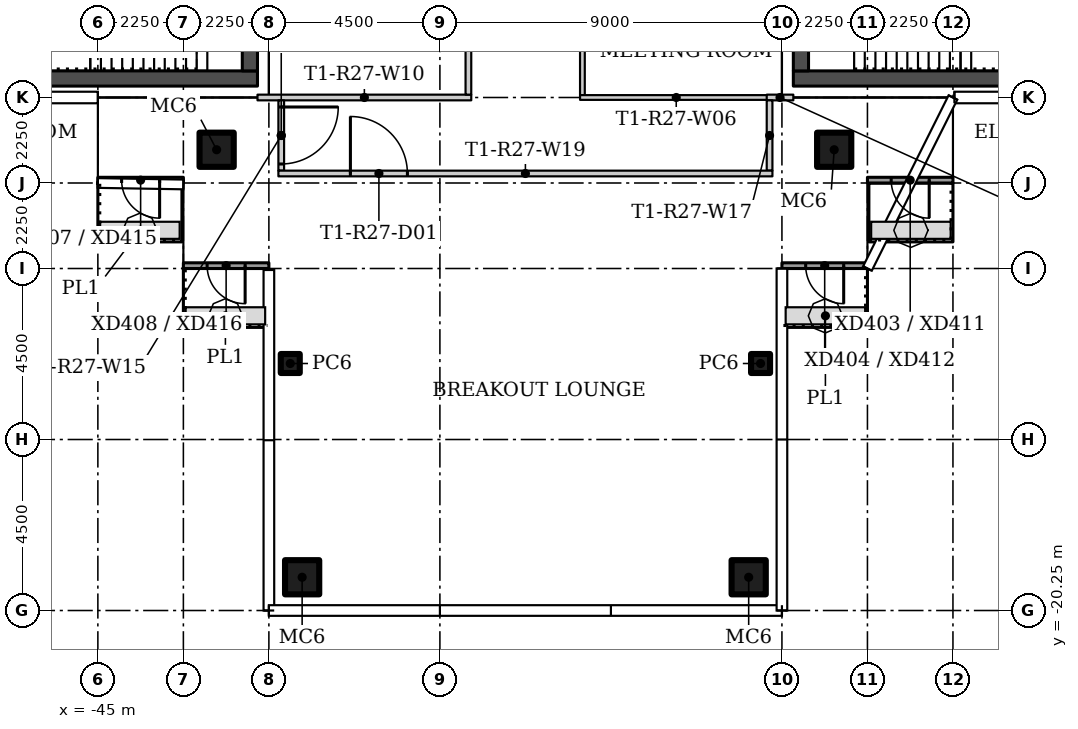
"""IFC4 building model, lengths in metres.
Left out: names, types, materials, properties, quantities, classifications, styles, units other than length and angle.
Written with IfcOpenShell. Run it as: python <this file> out.ifc"""

import sys

from ifc_helpers import new_model, si_unit, direction, frame, frame_2d, origin, origin_2d, place, context, subcontext, project, spatial, rectangle, hollow_rectangle, extrude, element, fill, save


model = new_model("IFC4")
c1 = context("Model", 3, precision=1e-05, world=origin(), true_north=direction((0.0, 1.0)))
c2 = subcontext(c1, "Body", "Model", "MODEL_VIEW")
j1 = project(units=[si_unit("LENGTHUNIT", "METRE"), si_unit("PLANEANGLEUNIT", "RADIAN")], contexts=[c1])
p1 = place(None, origin())
s1 = spatial("IfcSite", under=j1, at=p1, CompositionType="ELEMENT")
p2 = place(p1, origin())
s2 = spatial("IfcBuilding", under=s1, at=p2, CompositionType="ELEMENT")
p3 = place(p2, frame((0.0, 0.0, 249.9)))
s3 = spatial("IfcBuildingStorey", under=s2, at=p3, CompositionType="ELEMENT", Elevation=249.9)
for number, where in (
    (1, (-25.625, -8.125, 0.0)),
    (2, (-41.875, -8.125, 0.0)),
):
    element("IfcColumn", number, at=place(p3, frame(where)), inside=s3, PredefinedType="COLUMN", context=c2, shape_type="SweptSolid", body=[
        extrude(hollow_rectangle(XDim=0.9, YDim=0.9, WallThickness=0.036, at=origin_2d()), origin(), (0.0, 0.0, 1.0), 3.55),
    ])
p4 = place(p3, frame((-39.938, -13.75, 0.0)))
e3 = element("IfcColumn", 3, at=p4, inside=s3, PredefinedType="COLUMN", context=c2, shape_type="SweptSolid", body=[
    extrude(hollow_rectangle(XDim=0.5, YDim=0.5, WallThickness=0.016, at=origin_2d()), origin(), (0.0, 0.0, 1.0), 3.55),
])
p5 = place(p3, frame((-39.625, -19.375, 0.0)))
e4 = element("IfcColumn", 4, at=p5, inside=s3, PredefinedType="COLUMN", context=c2, shape_type="SweptSolid", body=[
    extrude(hollow_rectangle(XDim=0.9, YDim=0.9, WallThickness=0.036, at=origin_2d()), origin(), (0.0, 0.0, 1.0), 3.55),
])
p6 = place(p3, frame((-27.562, -13.75, 0.0)))
e5 = element("IfcColumn", 5, at=p6, inside=s3, PredefinedType="COLUMN", context=c2, shape_type="SweptSolid", body=[
    extrude(hollow_rectangle(XDim=0.5, YDim=0.5, WallThickness=0.016, at=origin_2d()), origin(), (0.0, 0.0, 1.0), 3.55),
])
p7 = place(p3, frame((-27.875, -19.375, 0.0)))
e6 = element("IfcColumn", 6, at=p7, inside=s3, PredefinedType="COLUMN", context=c2, shape_type="SweptSolid", body=[
    extrude(hollow_rectangle(XDim=0.9, YDim=0.9, WallThickness=0.036, at=origin_2d()), origin(), (0.0, 0.0, 1.0), 3.55),
])
p8 = place(p3, frame((-32.25, -0.013, 0.0), z_axis=(0.0, 0.0, 1.0), x_axis=(0.0, -1.0, 0.0)))
e7 = element("IfcWall", 7, at=p8, inside=s3, PredefinedType="PARTITIONING", context=c2, shape_type="SweptSolid", body=[
    extrude(rectangle(XDim=6.675, YDim=0.125, at=frame_2d((3.337, 0.0))), origin(), (0.0, 0.0, 1.0), 3.55),
])
p9 = place(p8, frame((2.887, 0.0, 0.0)))
e8 = element("IfcOpeningElement", 8, at=p9, cuts=e7, PredefinedType="OPENING", context=c2, shape_type="SweptSolid", body=[
    extrude(rectangle(XDim=0.9, YDim=2.1, at=frame_2d((0.45, 1.05))), frame((0.0, 0.073, 0.0), z_axis=(0.0, -1.0, 0.0), x_axis=(1.0, 0.0, 0.0)), (0.0, 0.0, 1.0), 0.145),
])
p10 = place(p3, frame((-32.312, -6.75, 0.0)))
e9 = element("IfcWall", 9, at=p10, inside=s3, PredefinedType="PARTITIONING", context=c2, shape_type="SweptSolid", body=[
    extrude(rectangle(XDim=5.062, YDim=0.125, at=frame_2d((2.531, 0.0))), origin(), (0.0, 0.0, 1.0), 3.55),
])
p11 = place(p3, frame((-40.8, -6.75, 0.0)))
e10 = element("IfcWall", 10, at=p11, inside=s3, PredefinedType="PARTITIONING", context=c2, shape_type="SweptSolid", body=[
    extrude(rectangle(XDim=5.625, YDim=0.15, at=frame_2d((2.812, 0.0))), origin(), (0.0, 0.0, 1.0), 3.55),
])
p12 = place(p3, frame((-27.4, -6.75, 0.0)))
e11 = element("IfcWall", 11, at=p12, inside=s3, PredefinedType="PARTITIONING", context=c2, shape_type="SweptSolid", body=[
    extrude(rectangle(XDim=0.7, YDim=0.15, at=frame_2d((0.35, 0.0))), origin(), (0.0, 0.0, 1.0), 3.55),
])
p13 = place(p3, frame((-35.25, -6.675, 0.0), z_axis=(0.0, 0.0, 1.0), x_axis=(0.0, 1.0, 0.0)))
e12 = element("IfcWall", 12, at=p13, inside=s3, PredefinedType="PARTITIONING", context=c2, shape_type="SweptSolid", body=[
    extrude(rectangle(XDim=6.65, YDim=0.15, at=frame_2d((3.325, 0.0))), origin(), (0.0, 0.0, 1.0), 3.55),
])
p14 = place(p13, frame((2.825, 0.0, 0.0)))
e13 = element("IfcOpeningElement", 13, at=p14, cuts=e12, PredefinedType="OPENING", context=c2, shape_type="SweptSolid", body=[
    extrude(rectangle(XDim=1.0, YDim=2.4, at=frame_2d((0.5, 1.2))), frame((0.0, 0.085, 0.0), z_axis=(0.0, -1.0, 0.0), x_axis=(1.0, 0.0, 0.0)), (0.0, 0.0, 1.0), 0.17),
])
p15 = place(p3, frame((-40.175, -6.825, 0.0), z_axis=(0.0, 0.0, 1.0), x_axis=(0.0, -1.0, 0.0)))
e14 = element("IfcWall", 14, at=p15, inside=s3, PredefinedType="PARTITIONING", context=c2, shape_type="SweptSolid", body=[
    extrude(rectangle(XDim=1.85, YDim=0.15, at=frame_2d((0.925, 0.0))), origin(), (0.0, 0.0, 1.0), 3.55),
])
p16 = place(p15, frame((0.175, 0.0, 0.0)))
e15 = element("IfcOpeningElement", 15, at=p16, cuts=e14, PredefinedType="OPENING", context=c2, shape_type="SweptSolid", body=[
    extrude(rectangle(XDim=1.5, YDim=2.1, at=frame_2d((0.75, 1.05))), frame((0.0, 0.085, 0.0), z_axis=(0.0, -1.0, 0.0), x_axis=(1.0, 0.0, 0.0)), (0.0, 0.0, 1.0), 0.17),
])
p17 = place(p3, frame((-27.325, -8.675, 0.0), z_axis=(0.0, 0.0, 1.0), x_axis=(0.0, 1.0, 0.0)))
e16 = element("IfcWall", 16, at=p17, inside=s3, PredefinedType="PARTITIONING", context=c2, shape_type="SweptSolid", body=[
    extrude(rectangle(XDim=1.85, YDim=0.15, at=frame_2d((0.925, 0.0))), origin(), (0.0, 0.0, 1.0), 3.55),
])
p18 = place(p3, frame((-40.25, -8.75, 0.0)))
e17 = element("IfcWall", 17, at=p18, inside=s3, PredefinedType="PARTITIONING", context=c2, shape_type="SweptSolid", body=[
    extrude(rectangle(XDim=13.0, YDim=0.15, at=frame_2d((6.5, 0.0))), origin(), (0.0, 0.0, 1.0), 3.55),
])
p19 = place(p18, frame((1.895, 0.0, 0.0)))
e18 = element("IfcOpeningElement", 18, at=p19, cuts=e17, PredefinedType="OPENING", context=c2, shape_type="SweptSolid", body=[
    extrude(rectangle(XDim=1.5, YDim=2.1, at=frame_2d((0.75, 1.05))), frame((0.0, 0.085, 0.0), z_axis=(0.0, -1.0, 0.0), x_axis=(1.0, 0.0, 0.0)), (0.0, 0.0, 1.0), 0.17),
])
p20 = place(p3, frame((-22.5, -8.925, 0.0), z_axis=(0.0, 0.0, 1.0), x_axis=(-1.0, 0.0, 0.0)))
e19 = element("IfcWall", 19, at=p20, inside=s3, PredefinedType="SOLIDWALL", context=c2, shape_type="SweptSolid", body=[
    extrude(rectangle(XDim=2.25, YDim=0.15, at=frame_2d((1.125, 0.0))), origin(), (0.0, 0.0, 1.0), 3.45),
])
p21 = place(p20, frame((0.625, 0.0, 0.0)))
e20 = element("IfcOpeningElement", 20, at=p21, cuts=e19, PredefinedType="OPENING", context=c2, shape_type="SweptSolid", body=[
    extrude(rectangle(XDim=1.0, YDim=2.4, at=frame_2d((0.5, 1.2))), frame((0.0, 0.085, 0.0), z_axis=(0.0, -1.0, 0.0), x_axis=(1.0, 0.0, 0.0)), (0.0, 0.0, 1.0), 0.17),
])
p22 = place(p3, frame((-24.75, -11.175, 0.0), z_axis=(0.0, 0.0, 1.0), x_axis=(-1.0, 0.0, 0.0)))
e21 = element("IfcWall", 21, at=p22, inside=s3, PredefinedType="SOLIDWALL", context=c2, shape_type="SweptSolid", body=[
    extrude(rectangle(XDim=2.25, YDim=0.15, at=frame_2d((1.125, 0.0))), origin(), (0.0, 0.0, 1.0), 3.45),
])
p23 = place(p22, frame((0.625, 0.0, 0.0)))
e22 = element("IfcOpeningElement", 22, at=p23, cuts=e21, PredefinedType="OPENING", context=c2, shape_type="SweptSolid", body=[
    extrude(rectangle(XDim=1.0, YDim=2.4, at=frame_2d((0.5, 1.2))), frame((0.0, 0.085, 0.0), z_axis=(0.0, -1.0, 0.0), x_axis=(1.0, 0.0, 0.0)), (0.0, 0.0, 1.0), 0.17),
])
p24 = place(p3, frame((-42.75, -8.925, 0.0), z_axis=(0.0, 0.0, 1.0), x_axis=(-1.0, 0.0, 0.0)))
e23 = element("IfcWall", 23, at=p24, inside=s3, PredefinedType="SOLIDWALL", context=c2, shape_type="SweptSolid", body=[
    extrude(rectangle(XDim=2.25, YDim=0.15, at=frame_2d((1.125, 0.0))), origin(), (0.0, 0.0, 1.0), 3.45),
])
p25 = place(p24, frame((0.625, 0.0, 0.0)))
e24 = element("IfcOpeningElement", 24, at=p25, cuts=e23, PredefinedType="OPENING", context=c2, shape_type="SweptSolid", body=[
    extrude(rectangle(XDim=1.0, YDim=2.4, at=frame_2d((0.5, 1.2))), frame((0.0, 0.085, 0.0), z_axis=(0.0, -1.0, 0.0), x_axis=(1.0, 0.0, 0.0)), (0.0, 0.0, 1.0), 0.17),
])
p26 = place(p3, frame((-40.5, -11.175, 0.0), z_axis=(0.0, 0.0, 1.0), x_axis=(-1.0, 0.0, 0.0)))
e25 = element("IfcWall", 25, at=p26, inside=s3, PredefinedType="SOLIDWALL", context=c2, shape_type="SweptSolid", body=[
    extrude(rectangle(XDim=2.25, YDim=0.15, at=frame_2d((1.125, 0.0))), origin(), (0.0, 0.0, 1.0), 3.45),
])
p27 = place(p26, frame((0.625, 0.0, 0.0)))
e26 = element("IfcOpeningElement", 26, at=p27, cuts=e25, PredefinedType="OPENING", context=c2, shape_type="SweptSolid", body=[
    extrude(rectangle(XDim=1.0, YDim=2.4, at=frame_2d((0.5, 1.2))), frame((0.0, 0.085, 0.0), z_axis=(0.0, -1.0, 0.0), x_axis=(1.0, 0.0, 0.0)), (0.0, 0.0, 1.0), 0.17),
])
p28 = place(p3, frame((-26.7, -6.25, 0.0)))
e27 = element("IfcWall", 27, at=p28, inside=s3, PredefinedType="SHEAR", context=c2, shape_type="SweptSolid", body=[
    extrude(rectangle(XDim=12.9, YDim=0.4, at=frame_2d((6.45, 0.0))), origin(), (0.0, 0.0, 1.0), 3.55),
])
p29 = place(p3, frame((-26.5, 6.05, 0.0), z_axis=(0.0, 0.0, 1.0), x_axis=(0.0, -1.0, 0.0)))
e28 = element("IfcWall", 28, at=p29, inside=s3, PredefinedType="SHEAR", context=c2, shape_type="SweptSolid", body=[
    extrude(rectangle(XDim=12.1, YDim=0.4, at=frame_2d((6.05, 0.0))), origin(), (0.0, 0.0, 1.0), 3.55),
])
p30 = place(p29, frame((3.9, 0.0, 0.0)))
e29 = element("IfcOpeningElement", 29, at=p30, cuts=e28, PredefinedType="OPENING", context=c2, shape_type="SweptSolid", body=[
    extrude(rectangle(XDim=1.8, YDim=2.4, at=frame_2d((0.9, 1.2))), frame((0.0, 0.21, 0.0), z_axis=(0.0, -1.0, 0.0), x_axis=(1.0, 0.0, 0.0)), (0.0, 0.0, 1.0), 0.42),
])
p31 = place(p3, frame((-40.8, -6.25, 0.0), z_axis=(0.0, 0.0, 1.0), x_axis=(-1.0, 0.0, 0.0)))
e30 = element("IfcWall", 30, at=p31, inside=s3, PredefinedType="SHEAR", context=c2, shape_type="SweptSolid", body=[
    extrude(rectangle(XDim=12.9, YDim=0.4, at=frame_2d((6.45, 0.0))), origin(), (0.0, 0.0, 1.0), 3.55),
])
p32 = place(p3, frame((-41.0, -6.05, 0.0), z_axis=(0.0, 0.0, 1.0), x_axis=(0.0, 1.0, 0.0)))
e31 = element("IfcWall", 31, at=p32, inside=s3, PredefinedType="SHEAR", context=c2, shape_type="SweptSolid", body=[
    extrude(rectangle(XDim=12.1, YDim=0.4, at=frame_2d((6.05, 0.0))), origin(), (0.0, 0.0, 1.0), 3.55),
])
p33 = place(p32, frame((6.4, 0.0, 0.0)))
e32 = element("IfcOpeningElement", 32, at=p33, cuts=e31, PredefinedType="OPENING", context=c2, shape_type="SweptSolid", body=[
    extrude(rectangle(XDim=1.8, YDim=2.4, at=frame_2d((0.9, 1.2))), frame((0.0, 0.21, 0.0), z_axis=(0.0, -1.0, 0.0), x_axis=(1.0, 0.0, 0.0)), (0.0, 0.0, 1.0), 0.42),
])
p34 = place(p19, origin())
e33 = element("IfcDoor", 33, at=p34, inside=s3, OperationType="DOUBLE_DOOR_SINGLE_SWING", PredefinedType="DOOR", context=c2, shape_type="SweptSolid", body=[
    extrude(rectangle(XDim=1.5, YDim=2.1, at=frame_2d((0.75, 1.05))), frame((0.0, 0.025, 0.0), z_axis=(0.0, -1.0, 0.0), x_axis=(1.0, 0.0, 0.0)), (0.0, 0.0, 1.0), 0.05),
])
fill(e18, e33)
p35 = place(p16, origin())
e34 = element("IfcDoor", 34, at=p35, inside=s3, OperationType="DOUBLE_DOOR_SINGLE_SWING", PredefinedType="DOOR", context=c2, shape_type="SweptSolid", body=[
    extrude(rectangle(XDim=1.5, YDim=2.1, at=frame_2d((0.75, 1.05))), frame((0.0, 0.025, 0.0), z_axis=(0.0, -1.0, 0.0), x_axis=(1.0, 0.0, 0.0)), (0.0, 0.0, 1.0), 0.05),
])
fill(e15, e34)
p36 = place(p21, origin())
e35 = element("IfcDoor", 35, at=p36, inside=s3, OperationType="SINGLE_SWING_RIGHT", PredefinedType="DOOR", context=c2, shape_type="SweptSolid", body=[
    extrude(rectangle(XDim=1.0, YDim=2.4, at=frame_2d((0.5, 1.2))), frame((0.0, 0.025, 0.0), z_axis=(0.0, -1.0, 0.0), x_axis=(1.0, 0.0, 0.0)), (0.0, 0.0, 1.0), 0.05),
])
fill(e20, e35)
p37 = place(p23, origin())
e36 = element("IfcDoor", 36, at=p37, inside=s3, OperationType="SINGLE_SWING_LEFT", PredefinedType="DOOR", context=c2, shape_type="SweptSolid", body=[
    extrude(rectangle(XDim=1.0, YDim=2.4, at=frame_2d((0.5, 1.2))), frame((0.0, 0.025, 0.0), z_axis=(0.0, -1.0, 0.0), x_axis=(1.0, 0.0, 0.0)), (0.0, 0.0, 1.0), 0.05),
])
fill(e22, e36)
p38 = place(p25, origin())
e37 = element("IfcDoor", 37, at=p38, inside=s3, OperationType="SINGLE_SWING_LEFT", PredefinedType="DOOR", context=c2, shape_type="SweptSolid", body=[
    extrude(rectangle(XDim=1.0, YDim=2.4, at=frame_2d((0.5, 1.2))), frame((0.0, 0.025, 0.0), z_axis=(0.0, -1.0, 0.0), x_axis=(1.0, 0.0, 0.0)), (0.0, 0.0, 1.0), 0.05),
])
fill(e24, e37)
p39 = place(p27, origin())
e38 = element("IfcDoor", 38, at=p39, inside=s3, OperationType="SINGLE_SWING_RIGHT", PredefinedType="DOOR", context=c2, shape_type="SweptSolid", body=[
    extrude(rectangle(XDim=1.0, YDim=2.4, at=frame_2d((0.5, 1.2))), frame((0.0, 0.025, 0.0), z_axis=(0.0, -1.0, 0.0), x_axis=(1.0, 0.0, 0.0)), (0.0, 0.0, 1.0), 0.05),
])
fill(e26, e38)
save(model, sys.argv[1])
